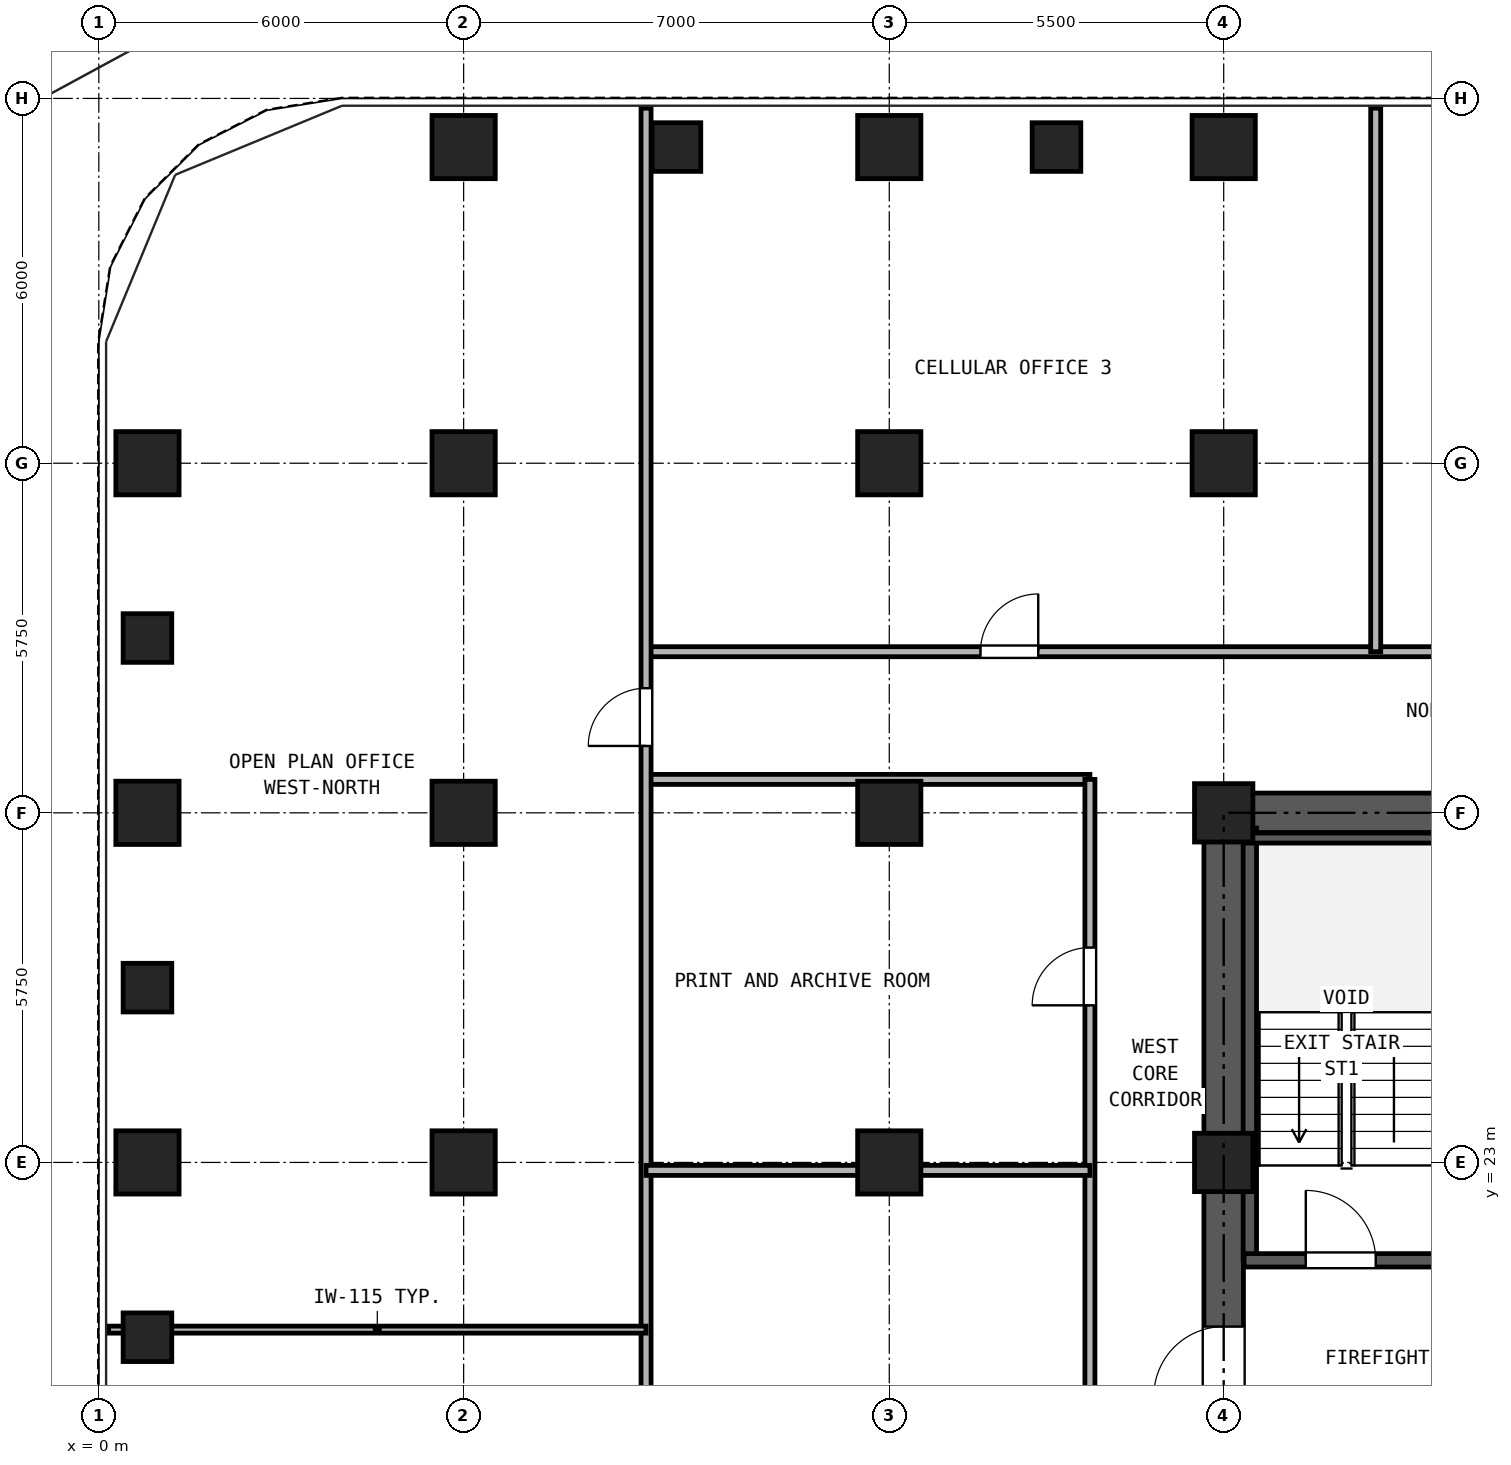
"""IFC4 building model, lengths in metres.
Left out: names, types, materials, properties, quantities, classifications, styles, units other than length and angle.
Written with IfcOpenShell. Run it as: python <this file> out.ifc"""

import sys

from ifc_helpers import new_model, si_unit, direction, frame, frame_2d, origin, origin_2d, place, context, subcontext, project, spatial, rectangle, hollow_rectangle, extrude, source, transform, mapped, element, fill, save


model = new_model("IFC4")
c1 = context("Model", 3, precision=1e-05, world=origin(), true_north=direction((0.0, 1.0)))
c2 = subcontext(c1, "Body", "Model", "MODEL_VIEW")
j1 = project(units=[si_unit("LENGTHUNIT", "METRE"), si_unit("PLANEANGLEUNIT", "RADIAN")], contexts=[c1])
p1 = place(None, origin())
s1 = spatial("IfcSite", under=j1, at=p1, CompositionType="ELEMENT")
p2 = place(p1, origin())
s2 = spatial("IfcBuilding", under=s1, at=p2, CompositionType="ELEMENT")
p3 = place(p2, frame((0.0, 0.0, 54.9)))
s3 = spatial("IfcBuildingStorey", under=s2, at=p3, CompositionType="ELEMENT", Elevation=54.9)
m1 = source(origin(), c2, "Body", "SweptSolid", [
    extrude(hollow_rectangle(XDim=1.04, YDim=1.04, WallThickness=0.065, at=origin_2d()), origin(), (0.0, 0.0, 1.0), 3.32),
])
for number, where, z_axis, x_axis in (
    (1, (6.0, 39.7, 0.0), (0.0, 0.0, 1.0), (1.0, 0.0, 0.0)),
    (2, (13.0, 39.7, 0.0), (0.0, 0.0, 1.0), (1.0, 0.0, 0.0)),
    (3, (18.5, 39.7, 0.0), (0.0, 0.0, 1.0), (1.0, 0.0, 0.0)),
    (4, (0.8, 23.0, 0.0), (0.0, 0.0, 1.0), (1.0, 0.0, 0.0)),
    (5, (0.8, 28.75, 0.0), (0.0, 0.0, 1.0), (1.0, 0.0, 0.0)),
    (6, (0.8, 34.5, 0.0), (0.0, 0.0, 1.0), (1.0, 0.0, 0.0)),
    (7, (6.0, 23.0, 0.0), (0.0, 0.0, 1.0), (1.0, 0.0, 0.0)),
    (8, (6.0, 28.75, 0.0), (0.0, 0.0, 1.0), (1.0, 0.0, 0.0)),
    (9, (6.0, 34.5, 0.0), (0.0, 0.0, 1.0), (1.0, 0.0, 0.0)),
    (10, (13.0, 23.0, 0.0), (0.0, 0.0, 1.0), (1.0, 0.0, 0.0)),
    (11, (13.0, 28.75, 0.0), (0.0, 0.0, 1.0), (1.0, 0.0, 0.0)),
    (12, (13.0, 34.5, 0.0), (0.0, 0.0, 1.0), (1.0, 0.0, 0.0)),
):
    element("IfcColumn", number, at=place(p3, frame(where, z_axis=z_axis, x_axis=x_axis)), inside=s3, PredefinedType="COLUMN", context=c2, shape_type="MappedRepresentation", body=[
        mapped(m1, transform((0.0, 0.0, 0.0), x_axis=(1.0, 0.0, 0.0), y_axis=(0.0, 1.0, 0.0), z_axis=(0.0, 0.0, 1.0), scale=1.0)),
    ])
m2 = source(origin(), c2, "Body", "SweptSolid", [
    extrude(hollow_rectangle(XDim=0.96, YDim=0.96, WallThickness=0.06, at=origin_2d()), origin(), (0.0, 0.0, 1.0), 3.32),
])
for number, where, z_axis, x_axis in (
    (13, (18.5, 23.0, 0.0), (0.0, 0.0, 1.0), (1.0, 0.0, 0.0)),
    (14, (18.5, 28.75, 0.0), (0.0, 0.0, 1.0), (1.0, 0.0, 0.0)),
):
    element("IfcColumn", number, at=place(p3, frame(where, z_axis=z_axis, x_axis=x_axis)), inside=s3, PredefinedType="COLUMN", context=c2, shape_type="MappedRepresentation", body=[
        mapped(m2, transform((0.0, 0.0, 0.0), x_axis=(1.0, 0.0, 0.0), y_axis=(0.0, 1.0, 0.0), z_axis=(0.0, 0.0, 1.0), scale=1.0)),
    ])
p4 = place(p3, frame((18.5, 34.5, 0.0), z_axis=(0.0, 0.0, 1.0), x_axis=(1.0, 0.0, 0.0)))
e15 = element("IfcColumn", 15, at=p4, inside=s3, PredefinedType="COLUMN", context=c2, shape_type="MappedRepresentation", body=[
    mapped(m1, transform((0.0, 0.0, 0.0), x_axis=(1.0, 0.0, 0.0), y_axis=(0.0, 1.0, 0.0), z_axis=(0.0, 0.0, 1.0), scale=1.0)),
])
m3 = source(origin(), c2, "Body", "SweptSolid", [
    extrude(hollow_rectangle(XDim=0.8, YDim=0.8, WallThickness=0.045, at=origin_2d()), origin(), (0.0, 0.0, 1.0), 3.32),
])
for number, where, z_axis, x_axis in (
    (16, (9.5, 39.7, 0.0), (0.0, 0.0, 1.0), (1.0, 0.0, 0.0)),
    (17, (15.75, 39.7, 0.0), (0.0, 0.0, 1.0), (1.0, 0.0, 0.0)),
    (18, (0.8, 20.125, 0.0), (0.0, 0.0, 1.0), (1.0, 0.0, 0.0)),
    (19, (0.8, 25.875, 0.0), (0.0, 0.0, 1.0), (1.0, 0.0, 0.0)),
    (20, (0.8, 31.625, 0.0), (0.0, 0.0, 1.0), (1.0, 0.0, 0.0)),
):
    element("IfcColumn", number, at=place(p3, frame(where, z_axis=z_axis, x_axis=x_axis)), inside=s3, PredefinedType="COLUMN", context=c2, shape_type="MappedRepresentation", body=[
        mapped(m3, transform((0.0, 0.0, 0.0), x_axis=(1.0, 0.0, 0.0), y_axis=(0.0, 1.0, 0.0), z_axis=(0.0, 0.0, 1.0), scale=1.0)),
    ])
p5 = place(p3, frame((18.175, 28.75, 0.0), z_axis=(0.0, 0.0, 1.0), x_axis=(1.0, 0.0, 0.0)))
e21 = element("IfcWall", 21, at=p5, inside=s3, PredefinedType="SHEAR", context=c2, shape_type="SweptSolid", body=[
    extrude(rectangle(XDim=10.65, YDim=0.65, at=frame_2d((5.325, 0.0))), origin(), (0.0, 0.0, 1.0), 3.32),
])
p6 = place(p5, frame((4.205, 0.0, 0.0)))
e22 = element("IfcOpeningElement", 22, at=p6, cuts=e21, PredefinedType="OPENING", context=c2, shape_type="SweptSolid", body=[
    extrude(rectangle(XDim=0.9, YDim=2.05, at=frame_2d((0.45, 1.025))), frame((0.0, 0.335, 0.0), z_axis=(0.0, -1.0, 0.0), x_axis=(1.0, 0.0, 0.0)), (0.0, 0.0, 1.0), 0.67),
])
p7 = place(p5, frame((5.745, 0.0, 0.0)))
e23 = element("IfcOpeningElement", 23, at=p7, cuts=e21, PredefinedType="OPENING", context=c2, shape_type="SweptSolid", body=[
    extrude(rectangle(XDim=0.9, YDim=2.05, at=frame_2d((0.45, 1.025))), frame((0.0, 0.335, 0.0), z_axis=(0.0, -1.0, 0.0), x_axis=(1.0, 0.0, 0.0)), (0.0, 0.0, 1.0), 0.67),
])
p8 = place(p3, frame((18.5, 11.825, 0.0), z_axis=(0.0, 0.0, 1.0), x_axis=(0.0, 1.0, 0.0)))
e24 = element("IfcWall", 24, at=p8, inside=s3, PredefinedType="SHEAR", context=c2, shape_type="SweptSolid", body=[
    extrude(rectangle(XDim=16.6, YDim=0.65, at=frame_2d((8.3, 0.0))), origin(), (0.0, 0.0, 1.0), 3.32),
])
p9 = place(p8, frame((7.325, 0.0, 0.0)))
e25 = element("IfcOpeningElement", 25, at=p9, cuts=e24, PredefinedType="OPENING", context=c2, shape_type="SweptSolid", body=[
    extrude(rectangle(XDim=1.15, YDim=2.2, at=frame_2d((0.575, 1.1))), frame((0.0, 0.335, 0.0), z_axis=(0.0, -1.0, 0.0), x_axis=(1.0, 0.0, 0.0)), (0.0, 0.0, 1.0), 0.67),
])
p10 = place(p3, frame((18.93, 21.39, 0.0), z_axis=(0.0, 0.0, 1.0), x_axis=(0.0, 1.0, 0.0)))
e26 = element("IfcWall", 26, at=p10, inside=s3, PredefinedType="SOLIDWALL", context=c2, shape_type="SweptSolid", body=[
    extrude(rectangle(XDim=7.11, YDim=0.22, at=frame_2d((3.555, 0.0))), origin(), (0.0, 0.0, 1.0), 3.32),
])
p11 = place(p3, frame((18.835, 28.335, 0.0), z_axis=(0.0, 0.0, 1.0), x_axis=(1.0, 0.0, 0.0)))
e27 = element("IfcWall", 27, at=p11, inside=s3, PredefinedType="PARTITIONING", context=c2, shape_type="SweptSolid", body=[
    extrude(rectangle(XDim=3.275, YDim=0.165, at=frame_2d((1.638, 0.0))), origin(), (0.0, 0.0, 1.0), 3.32),
])
p12 = place(p3, frame((18.835, 21.39, 0.0), z_axis=(0.0, 0.0, 1.0), x_axis=(1.0, 0.0, 0.0)))
e28 = element("IfcWall", 28, at=p12, inside=s3, PredefinedType="SOLIDWALL", context=c2, shape_type="SweptSolid", body=[
    extrude(rectangle(XDim=6.295, YDim=0.22, at=frame_2d((3.147, 0.0))), origin(), (0.0, 0.0, 1.0), 3.32),
])
p13 = place(p12, frame((1.015, 0.0, 0.0)))
e29 = element("IfcOpeningElement", 29, at=p13, cuts=e28, PredefinedType="OPENING", context=c2, shape_type="SweptSolid", body=[
    extrude(rectangle(XDim=1.15, YDim=2.2, at=frame_2d((0.575, 1.1))), frame((0.0, 0.12, 0.0), z_axis=(0.0, -1.0, 0.0), x_axis=(1.0, 0.0, 0.0)), (0.0, 0.0, 1.0), 0.24),
])
p14 = place(p12, frame((4.745, 0.0, 0.0)))
e30 = element("IfcOpeningElement", 30, at=p14, cuts=e28, PredefinedType="OPENING", context=c2, shape_type="SweptSolid", body=[
    extrude(rectangle(XDim=1.1, YDim=2.25, at=frame_2d((0.55, 1.125))), frame((0.0, 0.12, 0.0), z_axis=(0.0, -1.0, 0.0), x_axis=(1.0, 0.0, 0.0)), (0.0, 0.0, 1.0), 0.24),
])
p15 = place(p3, frame((9.0, 31.4, 0.0), z_axis=(0.0, 0.0, 1.0), x_axis=(1.0, 0.0, 0.0)))
e31 = element("IfcWall", 31, at=p15, inside=s3, PredefinedType="PARTITIONING", context=c2, shape_type="SweptSolid", body=[
    extrude(rectangle(XDim=29.0, YDim=0.165, at=frame_2d((14.5, 0.0))), origin(), (0.0, 0.0, 1.0), 2.898),
])
p16 = place(p15, frame((5.5, 0.0, 0.0)))
e32 = element("IfcOpeningElement", 32, at=p16, cuts=e31, PredefinedType="OPENING", context=c2, shape_type="SweptSolid", body=[
    extrude(rectangle(XDim=0.95, YDim=2.15, at=frame_2d((0.475, 1.075))), frame((0.0, 0.093, 0.0), z_axis=(0.0, -1.0, 0.0), x_axis=(1.0, 0.0, 0.0)), (0.0, 0.0, 1.0), 0.185),
])
p17 = place(p15, frame((15.0, 0.0, 0.0)))
e33 = element("IfcOpeningElement", 33, at=p17, cuts=e31, PredefinedType="OPENING", context=c2, shape_type="SweptSolid", body=[
    extrude(rectangle(XDim=0.95, YDim=2.15, at=frame_2d((0.475, 1.075))), frame((0.0, 0.093, 0.0), z_axis=(0.0, -1.0, 0.0), x_axis=(1.0, 0.0, 0.0)), (0.0, 0.0, 1.0), 0.185),
])
p18 = place(p15, frame((21.25, 0.0, 0.0)))
e34 = element("IfcOpeningElement", 34, at=p18, cuts=e31, PredefinedType="OPENING", context=c2, shape_type="SweptSolid", body=[
    extrude(rectangle(XDim=0.95, YDim=2.15, at=frame_2d((0.475, 1.075))), frame((0.0, 0.093, 0.0), z_axis=(0.0, -1.0, 0.0), x_axis=(1.0, 0.0, 0.0)), (0.0, 0.0, 1.0), 0.185),
])
p19 = place(p15, frame((26.25, 0.0, 0.0)))
e35 = element("IfcOpeningElement", 35, at=p19, cuts=e31, PredefinedType="OPENING", context=c2, shape_type="SweptSolid", body=[
    extrude(rectangle(XDim=0.95, YDim=2.15, at=frame_2d((0.475, 1.075))), frame((0.0, 0.093, 0.0), z_axis=(0.0, -1.0, 0.0), x_axis=(1.0, 0.0, 0.0)), (0.0, 0.0, 1.0), 0.185),
])
p20 = place(p3, frame((9.0, 29.3, 0.0), z_axis=(0.0, 0.0, 1.0), x_axis=(1.0, 0.0, 0.0)))
e36 = element("IfcWall", 36, at=p20, inside=s3, PredefinedType="PARTITIONING", context=c2, shape_type="SweptSolid", body=[
    extrude(rectangle(XDim=7.3, YDim=0.165, at=frame_2d((3.65, 0.0))), origin(), (0.0, 0.0, 1.0), 3.32),
])
p21 = place(p3, frame((16.3, 11.05, 0.0), z_axis=(0.0, 0.0, 1.0), x_axis=(0.0, 1.0, 0.0)))
e37 = element("IfcWall", 37, at=p21, inside=s3, PredefinedType="PARTITIONING", context=c2, shape_type="SweptSolid", body=[
    extrude(rectangle(XDim=18.25, YDim=0.165, at=frame_2d((9.125, 0.0))), origin(), (0.0, 0.0, 1.0), 3.32),
])
p22 = place(p21, frame((5.409, 0.0, 0.0)))
e38 = element("IfcOpeningElement", 38, at=p22, cuts=e37, PredefinedType="OPENING", context=c2, shape_type="SweptSolid", body=[
    extrude(rectangle(XDim=0.95, YDim=2.15, at=frame_2d((0.475, 1.075))), frame((0.0, 0.093, 0.0), z_axis=(0.0, -1.0, 0.0), x_axis=(1.0, 0.0, 0.0)), (0.0, 0.0, 1.0), 0.185),
])
p23 = place(p21, frame((14.534, 0.0, 0.0)))
e39 = element("IfcOpeningElement", 39, at=p23, cuts=e37, PredefinedType="OPENING", context=c2, shape_type="SweptSolid", body=[
    extrude(rectangle(XDim=0.95, YDim=2.15, at=frame_2d((0.475, 1.075))), frame((0.0, 0.093, 0.0), z_axis=(0.0, -1.0, 0.0), x_axis=(1.0, 0.0, 0.0)), (0.0, 0.0, 1.0), 0.185),
])
p24 = place(p3, frame((9.0, 0.16, 0.0), z_axis=(0.0, 0.0, 1.0), x_axis=(0.0, 1.0, 0.0)))
e40 = element("IfcWall", 40, at=p24, inside=s3, PredefinedType="PARTITIONING", context=c2, shape_type="SweptSolid", body=[
    extrude(rectangle(XDim=40.18, YDim=0.165, at=frame_2d((20.09, 0.0))), origin(), (0.0, 0.0, 1.0), 3.32),
])
p25 = place(p24, frame((9.34, 0.0, 0.0)))
e41 = element("IfcOpeningElement", 41, at=p25, cuts=e40, PredefinedType="OPENING", context=c2, shape_type="SweptSolid", body=[
    extrude(rectangle(XDim=0.95, YDim=2.15, at=frame_2d((0.475, 1.075))), frame((0.0, 0.093, 0.0), z_axis=(0.0, -1.0, 0.0), x_axis=(1.0, 0.0, 0.0)), (0.0, 0.0, 1.0), 0.185),
])
p26 = place(p24, frame((29.69, 0.0, 0.0)))
e42 = element("IfcOpeningElement", 42, at=p26, cuts=e40, PredefinedType="OPENING", context=c2, shape_type="SweptSolid", body=[
    extrude(rectangle(XDim=0.95, YDim=2.15, at=frame_2d((0.475, 1.075))), frame((0.0, 0.093, 0.0), z_axis=(0.0, -1.0, 0.0), x_axis=(1.0, 0.0, 0.0)), (0.0, 0.0, 1.0), 0.185),
])
p27 = place(p3, frame((21.0, 31.4, 0.0), z_axis=(0.0, 0.0, 1.0), x_axis=(0.0, 1.0, 0.0)))
e43 = element("IfcWall", 43, at=p27, inside=s3, PredefinedType="PARTITIONING", context=c2, shape_type="SweptSolid", body=[
    extrude(rectangle(XDim=8.94, YDim=0.165, at=frame_2d((4.47, 0.0))), origin(), (0.0, 0.0, 1.0), 3.32),
])
p28 = place(p3, frame((0.16, 20.25, 0.0), z_axis=(0.0, 0.0, 1.0), x_axis=(1.0, 0.0, 0.0)))
e44 = element("IfcWall", 44, at=p28, inside=s3, PredefinedType="PARTITIONING", context=c2, shape_type="SweptSolid", body=[
    extrude(rectangle(XDim=8.84, YDim=0.115, at=frame_2d((4.42, 0.0))), origin(), (0.0, 0.0, 1.0), 2.898),
])
p29 = place(p3, frame((9.0, 22.869, 0.0), z_axis=(0.0, 0.0, 1.0), x_axis=(1.0, 0.0, 0.0)))
e45 = element("IfcWall", 45, at=p29, inside=s3, PredefinedType="PARTITIONING", context=c2, shape_type="SweptSolid", body=[
    extrude(rectangle(XDim=7.3, YDim=0.165, at=frame_2d((3.65, 0.0))), origin(), (0.0, 0.0, 1.0), 2.539),
])
p30 = place(p13, frame((1.15, 0.0, 0.0), z_axis=(0.0, 0.0, 1.0), x_axis=(-1.0, 0.0, 0.0)))
e46 = element("IfcDoor", 46, at=p30, inside=s3, OperationType="SINGLE_SWING_LEFT", PredefinedType="DOOR", context=c2, shape_type="SweptSolid", body=[
    extrude(rectangle(XDim=1.15, YDim=2.2, at=frame_2d((0.575, 1.1))), frame((0.0, 0.025, 0.0), z_axis=(0.0, -1.0, 0.0), x_axis=(1.0, 0.0, 0.0)), (0.0, 0.0, 1.0), 0.05),
])
fill(e29, e46)
p31 = place(p9, frame((1.15, 0.0, 0.0), z_axis=(0.0, 0.0, 1.0), x_axis=(-1.0, 0.0, 0.0)))
e47 = element("IfcDoor", 47, at=p31, inside=s3, OperationType="SINGLE_SWING_LEFT", PredefinedType="DOOR", context=c2, shape_type="SweptSolid", body=[
    extrude(rectangle(XDim=1.15, YDim=2.2, at=frame_2d((0.575, 1.1))), frame((0.0, 0.025, 0.0), z_axis=(0.0, -1.0, 0.0), x_axis=(1.0, 0.0, 0.0)), (0.0, 0.0, 1.0), 0.05),
])
fill(e25, e47)
p32 = place(p16, origin())
e48 = element("IfcDoor", 48, at=p32, inside=s3, OperationType="SINGLE_SWING_RIGHT", PredefinedType="DOOR", context=c2, shape_type="SweptSolid", body=[
    extrude(rectangle(XDim=0.95, YDim=2.15, at=frame_2d((0.475, 1.075))), frame((0.0, 0.025, 0.0), z_axis=(0.0, -1.0, 0.0), x_axis=(1.0, 0.0, 0.0)), (0.0, 0.0, 1.0), 0.05),
])
fill(e32, e48)
p33 = place(p26, frame((0.95, 0.0, 0.0), z_axis=(0.0, 0.0, 1.0), x_axis=(-1.0, 0.0, 0.0)))
e49 = element("IfcDoor", 49, at=p33, inside=s3, OperationType="SINGLE_SWING_LEFT", PredefinedType="DOOR", context=c2, shape_type="SweptSolid", body=[
    extrude(rectangle(XDim=0.95, YDim=2.15, at=frame_2d((0.475, 1.075))), frame((0.0, 0.025, 0.0), z_axis=(0.0, -1.0, 0.0), x_axis=(1.0, 0.0, 0.0)), (0.0, 0.0, 1.0), 0.05),
])
fill(e42, e49)
p34 = place(p23, frame((0.95, 0.0, 0.0), z_axis=(0.0, 0.0, 1.0), x_axis=(-1.0, 0.0, 0.0)))
e50 = element("IfcDoor", 50, at=p34, inside=s3, OperationType="SINGLE_SWING_LEFT", PredefinedType="DOOR", context=c2, shape_type="SweptSolid", body=[
    extrude(rectangle(XDim=0.95, YDim=2.15, at=frame_2d((0.475, 1.075))), frame((0.0, 0.025, 0.0), z_axis=(0.0, -1.0, 0.0), x_axis=(1.0, 0.0, 0.0)), (0.0, 0.0, 1.0), 0.05),
])
fill(e39, e50)
save(model, sys.argv[1])
